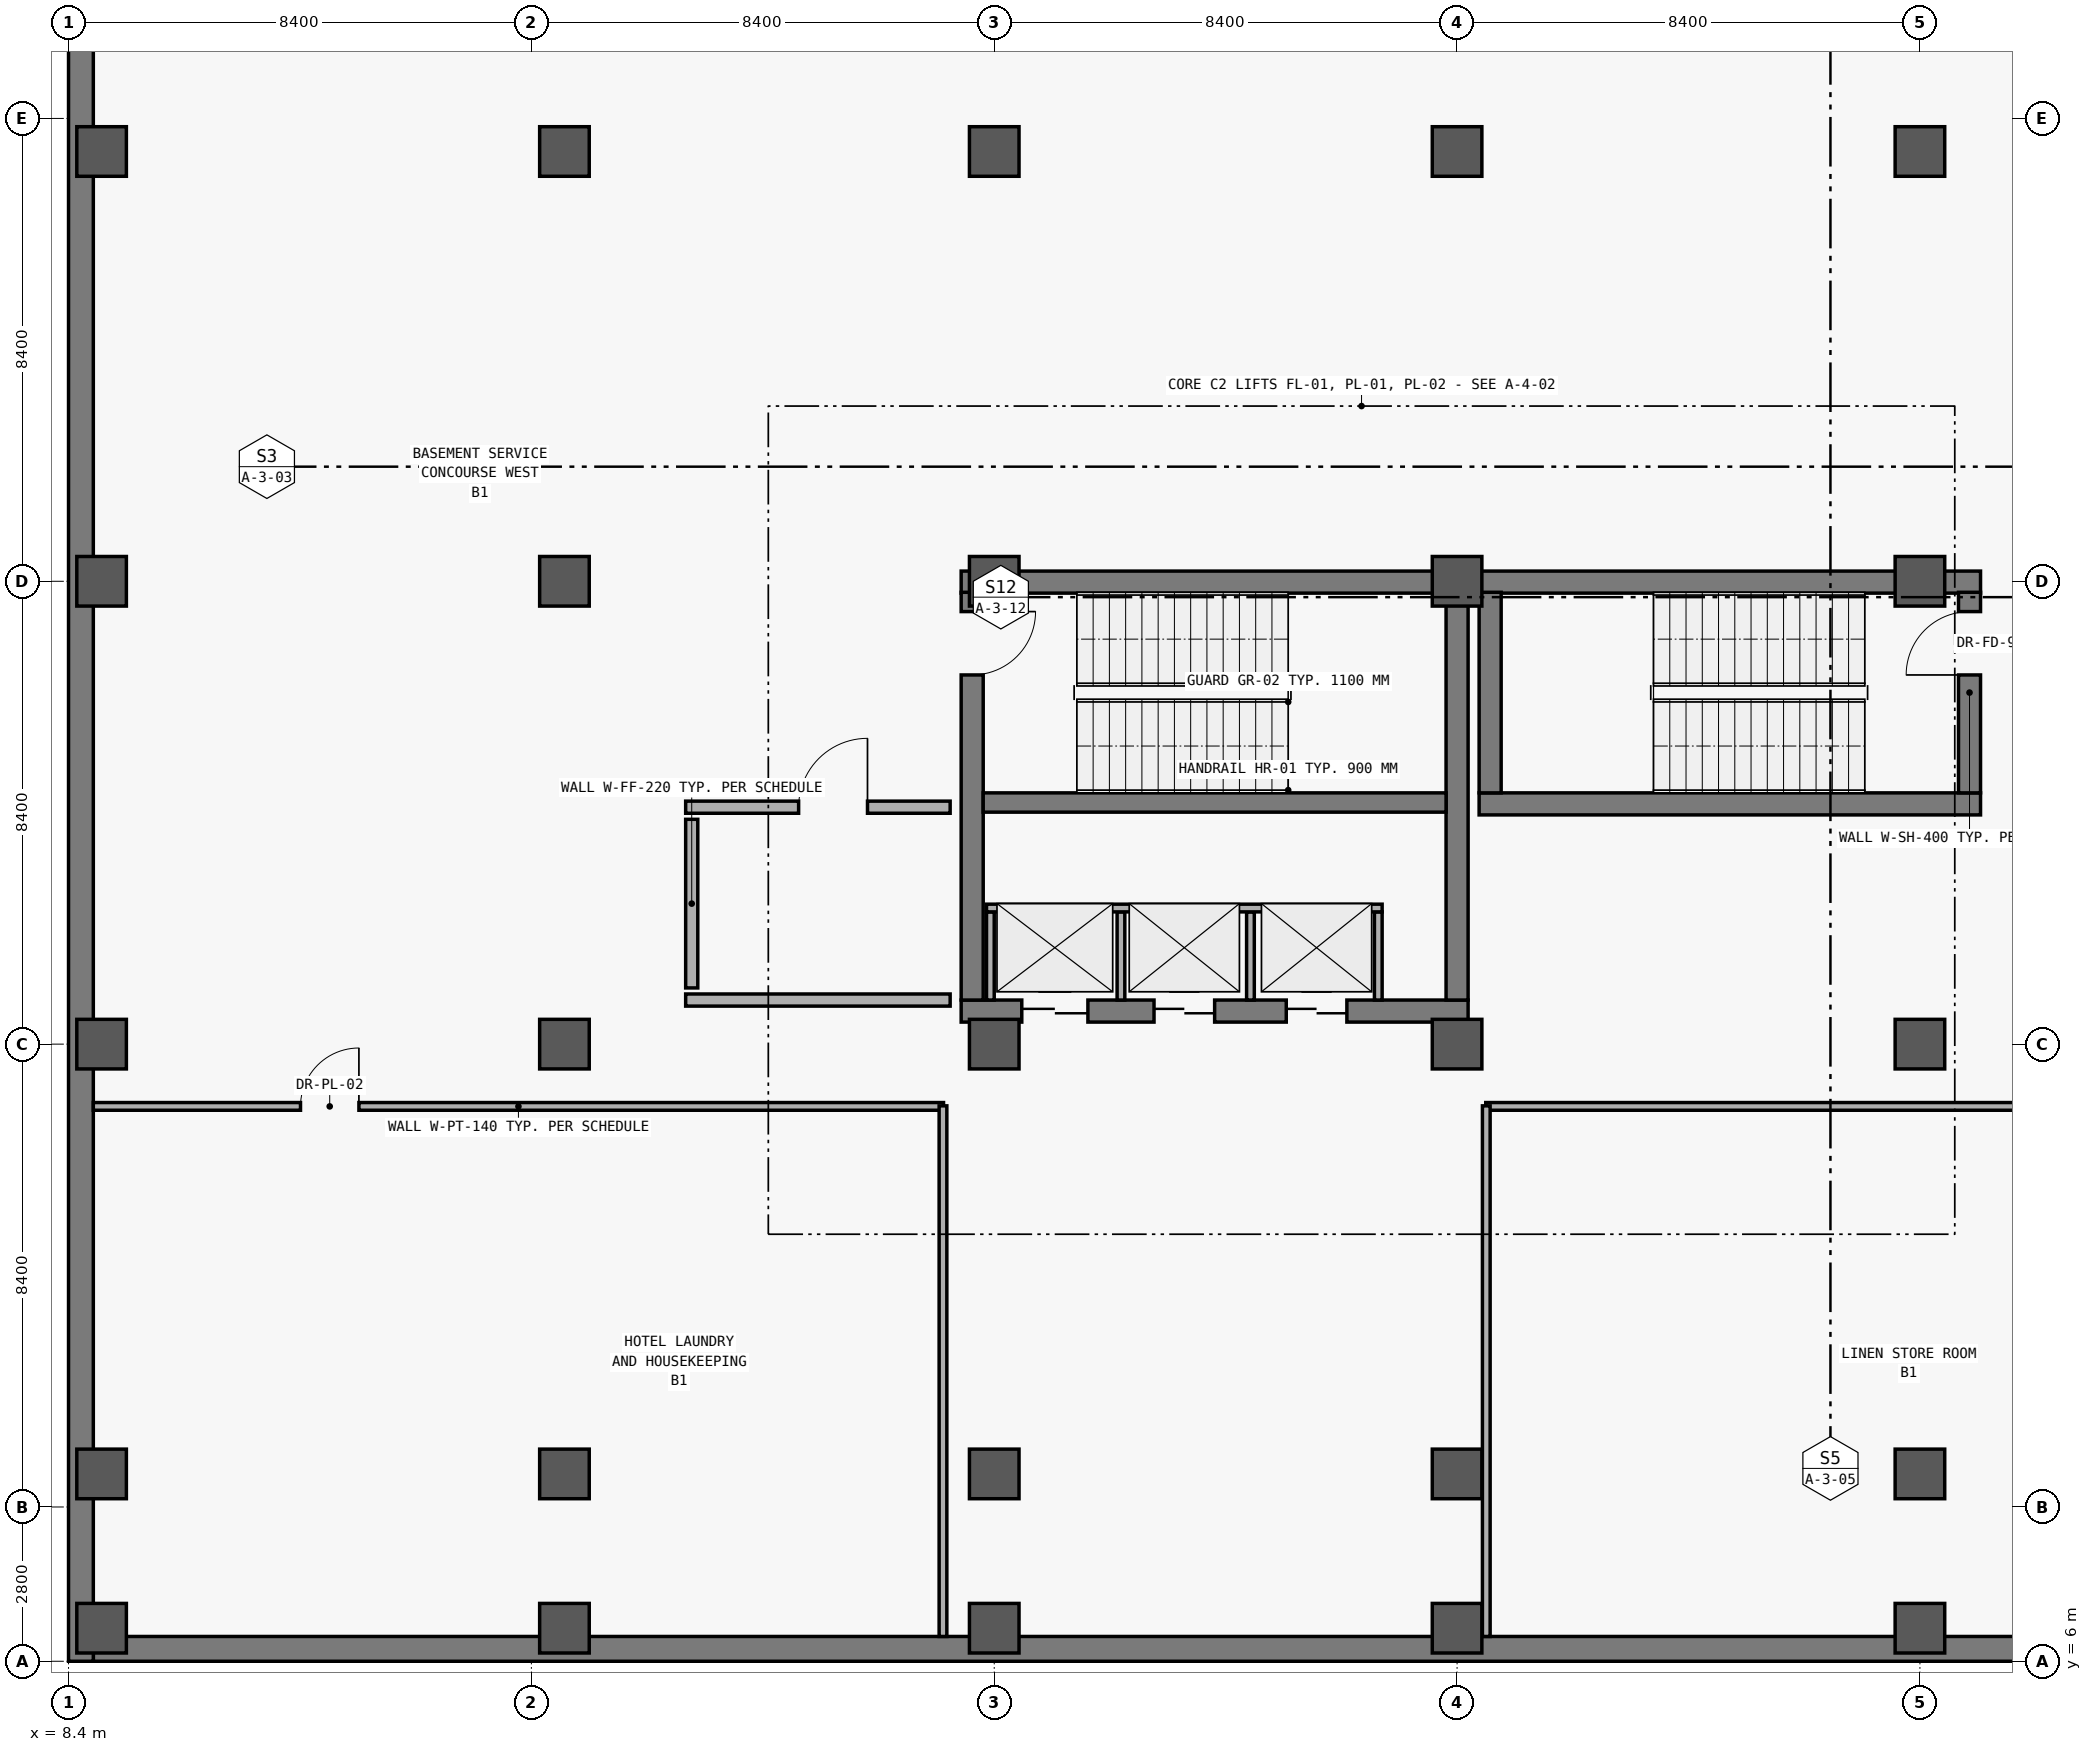
"""IFC4 building model, lengths in metres.
Left out: names, types, materials, properties, quantities, classifications, styles, units other than length and angle.
Written with IfcOpenShell. Run it as: python <this file> out.ifc"""

import sys

from ifc_helpers import new_model, si_unit, direction, frame, frame_2d, origin, origin_2d, place, context, subcontext, project, spatial, rectangle, extrude, element, fill, save


model = new_model("IFC4")
c1 = context("Model", 3, precision=1e-05, world=origin(), true_north=direction((0.0, 1.0)))
c2 = subcontext(c1, "Body", "Model", "MODEL_VIEW")
j1 = project(units=[si_unit("LENGTHUNIT", "METRE"), si_unit("PLANEANGLEUNIT", "RADIAN")], contexts=[c1])
p1 = place(None, origin())
s1 = spatial("IfcSite", under=j1, at=p1, CompositionType="ELEMENT")
p2 = place(p1, origin())
s2 = spatial("IfcBuilding", under=s1, at=p2, CompositionType="ELEMENT")
p3 = place(p2, frame((0.0, 0.0, -4.8)))
s3 = spatial("IfcBuildingStorey", under=s2, at=p3, CompositionType="ELEMENT", Elevation=-4.8)
p4 = place(p3, frame((142.2, 6.225, 0.0), z_axis=(0.0, 0.0, 1.0), x_axis=(-1.0, 0.0, 0.0)))
e1 = element("IfcWall", 1, at=p4, inside=s3, PredefinedType="USERDEFINED", context=c2, shape_type="SweptSolid", body=[
    extrude(rectangle(XDim=133.35, YDim=0.45, at=frame_2d((66.675, 0.0))), origin(), (0.0, 0.0, 1.0), 4.48),
])
p5 = place(p3, frame((8.625, 6.0, 0.0), z_axis=(0.0, 0.0, 1.0), x_axis=(0.0, 1.0, 0.0)))
e2 = element("IfcWall", 2, at=p5, inside=s3, PredefinedType="USERDEFINED", context=c2, shape_type="SweptSolid", body=[
    extrude(rectangle(XDim=112.0, YDim=0.45, at=frame_2d((56.0, 0.0))), origin(), (0.0, 0.0, 1.0), 4.48),
])
for number, where, z_axis, x_axis in (
    (3, (9.0, 6.6, 0.0), (0.0, 0.0, 1.0), (1.0, 0.0, 0.0)),
    (4, (9.0, 9.4, 0.0), (0.0, 0.0, 1.0), (1.0, 0.0, 0.0)),
    (5, (9.0, 17.2, 0.0), (0.0, 0.0, 1.0), (1.0, 0.0, 0.0)),
    (6, (9.0, 25.6, 0.0), (0.0, 0.0, 1.0), (1.0, 0.0, 0.0)),
    (7, (9.0, 33.4, 0.0), (0.0, 0.0, 1.0), (1.0, 0.0, 0.0)),
    (8, (17.4, 6.6, 0.0), (0.0, 0.0, 1.0), (1.0, 0.0, 0.0)),
    (9, (17.4, 9.4, 0.0), (0.0, 0.0, 1.0), (1.0, 0.0, 0.0)),
    (10, (17.4, 17.2, 0.0), (0.0, 0.0, 1.0), (1.0, 0.0, 0.0)),
    (11, (17.4, 25.6, 0.0), (0.0, 0.0, 1.0), (1.0, 0.0, 0.0)),
    (12, (17.4, 33.4, 0.0), (0.0, 0.0, 1.0), (1.0, 0.0, 0.0)),
    (13, (25.2, 6.6, 0.0), (0.0, 0.0, 1.0), (1.0, 0.0, 0.0)),
    (14, (25.2, 9.4, 0.0), (0.0, 0.0, 1.0), (1.0, 0.0, 0.0)),
    (15, (25.2, 17.2, 0.0), (0.0, 0.0, 1.0), (1.0, 0.0, 0.0)),
    (16, (25.2, 25.6, 0.0), (0.0, 0.0, 1.0), (1.0, 0.0, 0.0)),
    (17, (25.2, 33.4, 0.0), (0.0, 0.0, 1.0), (1.0, 0.0, 0.0)),
    (18, (33.6, 6.6, 0.0), (0.0, 0.0, 1.0), (1.0, 0.0, 0.0)),
    (19, (33.6, 9.4, 0.0), (0.0, 0.0, 1.0), (1.0, 0.0, 0.0)),
    (20, (33.6, 17.2, 0.0), (0.0, 0.0, 1.0), (1.0, 0.0, 0.0)),
    (21, (33.6, 25.6, 0.0), (0.0, 0.0, 1.0), (1.0, 0.0, 0.0)),
    (22, (33.6, 33.4, 0.0), (0.0, 0.0, 1.0), (1.0, 0.0, 0.0)),
    (23, (42.0, 6.6, 0.0), (0.0, 0.0, 1.0), (1.0, 0.0, 0.0)),
    (24, (42.0, 9.4, 0.0), (0.0, 0.0, 1.0), (1.0, 0.0, 0.0)),
    (25, (42.0, 17.2, 0.0), (0.0, 0.0, 1.0), (1.0, 0.0, 0.0)),
    (26, (42.0, 25.6, 0.0), (0.0, 0.0, 1.0), (1.0, 0.0, 0.0)),
    (27, (42.0, 33.4, 0.0), (0.0, 0.0, 1.0), (1.0, 0.0, 0.0)),
):
    element("IfcColumn", number, at=place(p3, frame(where, z_axis=z_axis, x_axis=x_axis)), inside=s3, PredefinedType="COLUMN", context=c2, shape_type="SweptSolid", body=[
        extrude(rectangle(XDim=0.9, YDim=0.9, at=origin_2d()), origin(), (0.0, 0.0, 1.0), 4.8),
    ])
p6 = place(p3, frame((24.6, 17.8, 0.0), z_axis=(0.0, 0.0, 1.0), x_axis=(1.0, 0.0, 0.0)))
e28 = element("IfcWall", 28, at=p6, inside=s3, PredefinedType="SHEAR", context=c2, shape_type="SweptSolid", body=[
    extrude(rectangle(XDim=9.2, YDim=0.4, at=frame_2d((4.6, 0.0))), origin(), (0.0, 0.0, 1.0), 4.48),
])
p7 = place(p6, frame((1.1, 0.0, 0.0)))
e29 = element("IfcOpeningElement", 29, at=p7, cuts=e28, PredefinedType="OPENING", context=c2, shape_type="SweptSolid", body=[
    extrude(rectangle(XDim=1.2, YDim=2.2, at=frame_2d((0.6, 1.1))), frame((0.0, 0.21, 0.0), z_axis=(0.0, -1.0, 0.0), x_axis=(1.0, 0.0, 0.0)), (0.0, 0.0, 1.0), 0.42),
])
p8 = place(p6, frame((3.5, 0.0, 0.0)))
e30 = element("IfcOpeningElement", 30, at=p8, cuts=e28, PredefinedType="OPENING", context=c2, shape_type="SweptSolid", body=[
    extrude(rectangle(XDim=1.1, YDim=2.2, at=frame_2d((0.55, 1.1))), frame((0.0, 0.21, 0.0), z_axis=(0.0, -1.0, 0.0), x_axis=(1.0, 0.0, 0.0)), (0.0, 0.0, 1.0), 0.42),
])
p9 = place(p6, frame((5.9, 0.0, 0.0)))
e31 = element("IfcOpeningElement", 31, at=p9, cuts=e28, PredefinedType="OPENING", context=c2, shape_type="SweptSolid", body=[
    extrude(rectangle(XDim=1.1, YDim=2.2, at=frame_2d((0.55, 1.1))), frame((0.0, 0.21, 0.0), z_axis=(0.0, -1.0, 0.0), x_axis=(1.0, 0.0, 0.0)), (0.0, 0.0, 1.0), 0.42),
])
p10 = place(p3, frame((33.8, 25.585, 0.0), z_axis=(0.0, 0.0, 1.0), x_axis=(-1.0, 0.0, 0.0)))
e32 = element("IfcWall", 32, at=p10, inside=s3, PredefinedType="SHEAR", context=c2, shape_type="SweptSolid", body=[
    extrude(rectangle(XDim=9.2, YDim=0.4, at=frame_2d((4.6, 0.0))), origin(), (0.0, 0.0, 1.0), 4.48),
])
p11 = place(p3, frame((24.8, 25.4, 0.0), z_axis=(0.0, 0.0, 1.0), x_axis=(0.0, -1.0, 0.0)))
e33 = element("IfcWall", 33, at=p11, inside=s3, PredefinedType="SHEAR", context=c2, shape_type="SweptSolid", body=[
    extrude(rectangle(XDim=7.4, YDim=0.4, at=frame_2d((3.7, 0.0))), origin(), (0.0, 0.0, 1.0), 4.48),
])
p12 = place(p11, frame((0.35, 0.0, 0.0)))
e34 = element("IfcOpeningElement", 34, at=p12, cuts=e33, PredefinedType="OPENING", context=c2, shape_type="SweptSolid", body=[
    extrude(rectangle(XDim=1.15, YDim=2.2, at=frame_2d((0.575, 1.1))), frame((0.0, 0.21, 0.0), z_axis=(0.0, -1.0, 0.0), x_axis=(1.0, 0.0, 0.0)), (0.0, 0.0, 1.0), 0.42),
])
p13 = place(p3, frame((33.6, 18.0, 0.0), z_axis=(0.0, 0.0, 1.0), x_axis=(0.0, 1.0, 0.0)))
e35 = element("IfcWall", 35, at=p13, inside=s3, PredefinedType="SHEAR", context=c2, shape_type="SweptSolid", body=[
    extrude(rectangle(XDim=7.4, YDim=0.4, at=frame_2d((3.7, 0.0))), origin(), (0.0, 0.0, 1.0), 4.48),
])
p14 = place(p3, frame((25.0, 21.585, 0.0), z_axis=(0.0, 0.0, 1.0), x_axis=(1.0, 0.0, 0.0)))
e36 = element("IfcWall", 36, at=p14, inside=s3, PredefinedType="SHEAR", context=c2, shape_type="SweptSolid", body=[
    extrude(rectangle(XDim=8.4, YDim=0.35, at=frame_2d((4.2, 0.0))), origin(), (0.0, 0.0, 1.0), 4.48),
])
for number, where, z_axis, x_axis in (
    (37, (25.13, 18.0, 0.0), (0.0, 0.0, 1.0), (0.0, 1.0, 0.0)),
    (38, (27.5, 18.0, 0.0), (0.0, 0.0, 1.0), (0.0, 1.0, 0.0)),
    (39, (29.85, 18.0, 0.0), (0.0, 0.0, 1.0), (0.0, 1.0, 0.0)),
    (40, (32.17, 18.0, 0.0), (0.0, 0.0, 1.0), (0.0, 1.0, 0.0)),
):
    element("IfcWall", number, at=place(p3, frame(where, z_axis=z_axis, x_axis=x_axis)), inside=s3, PredefinedType="PARTITIONING", context=c2, shape_type="SweptSolid", body=[
        extrude(rectangle(XDim=1.6, YDim=0.14, at=frame_2d((0.8, 0.0))), origin(), (0.0, 0.0, 1.0), 3.63),
    ])
p15 = place(p3, frame((25.06, 19.67, 0.0), z_axis=(0.0, 0.0, 1.0), x_axis=(1.0, 0.0, 0.0)))
e41 = element("IfcWall", 41, at=p15, inside=s3, PredefinedType="PARTITIONING", context=c2, shape_type="SweptSolid", body=[
    extrude(rectangle(XDim=7.18, YDim=0.14, at=frame_2d((3.59, 0.0))), origin(), (0.0, 0.0, 1.0), 3.63),
])
p16 = place(p3, frame((19.6, 18.0, 0.0), z_axis=(0.0, 0.0, 1.0), x_axis=(1.0, 0.0, 0.0)))
e42 = element("IfcWall", 42, at=p16, inside=s3, PredefinedType="SOLIDWALL", context=c2, shape_type="SweptSolid", body=[
    extrude(rectangle(XDim=4.8, YDim=0.22, at=frame_2d((2.4, 0.0))), origin(), (0.0, 0.0, 1.0), 3.63),
])
p17 = place(p3, frame((19.6, 21.5, 0.0), z_axis=(0.0, 0.0, 1.0), x_axis=(1.0, 0.0, 0.0)))
e43 = element("IfcWall", 43, at=p17, inside=s3, PredefinedType="SOLIDWALL", context=c2, shape_type="SweptSolid", body=[
    extrude(rectangle(XDim=4.8, YDim=0.22, at=frame_2d((2.4, 0.0))), origin(), (0.0, 0.0, 1.0), 3.63),
])
p18 = place(p17, frame((2.05, 0.0, 0.0)))
e44 = element("IfcOpeningElement", 44, at=p18, cuts=e43, PredefinedType="OPENING", context=c2, shape_type="SweptSolid", body=[
    extrude(rectangle(XDim=1.25, YDim=2.2, at=frame_2d((0.625, 1.1))), frame((0.0, 0.12, 0.0), z_axis=(0.0, -1.0, 0.0), x_axis=(1.0, 0.0, 0.0)), (0.0, 0.0, 1.0), 0.24),
])
p19 = place(p3, frame((19.71, 18.22, 0.0), z_axis=(0.0, 0.0, 1.0), x_axis=(0.0, 1.0, 0.0)))
e45 = element("IfcWall", 45, at=p19, inside=s3, PredefinedType="SOLIDWALL", context=c2, shape_type="SweptSolid", body=[
    extrude(rectangle(XDim=3.06, YDim=0.22, at=frame_2d((1.53, 0.0))), origin(), (0.0, 0.0, 1.0), 3.63),
])
for number, where, z_axis, x_axis in (
    (46, (34.0, 21.56, 0.0), (0.0, 0.0, 1.0), (1.0, 0.0, 0.0)),
    (47, (43.1, 25.585, 0.0), (0.0, 0.0, 1.0), (-1.0, 0.0, 0.0)),
):
    element("IfcWall", number, at=place(p3, frame(where, z_axis=z_axis, x_axis=x_axis)), inside=s3, PredefinedType="SHEAR", context=c2, shape_type="SweptSolid", body=[
        extrude(rectangle(XDim=9.1, YDim=0.4, at=frame_2d((4.55, 0.0))), origin(), (0.0, 0.0, 1.0), 4.48),
    ])
p20 = place(p3, frame((34.2, 25.4, 0.0), z_axis=(0.0, 0.0, 1.0), x_axis=(0.0, -1.0, 0.0)))
e48 = element("IfcWall", 48, at=p20, inside=s3, PredefinedType="SHEAR", context=c2, shape_type="SweptSolid", body=[
    extrude(rectangle(XDim=3.64, YDim=0.4, at=frame_2d((1.82, 0.0))), origin(), (0.0, 0.0, 1.0), 4.48),
])
p21 = place(p3, frame((42.9, 21.76, 0.0), z_axis=(0.0, 0.0, 1.0), x_axis=(0.0, 1.0, 0.0)))
e49 = element("IfcWall", 49, at=p21, inside=s3, PredefinedType="SHEAR", context=c2, shape_type="SweptSolid", body=[
    extrude(rectangle(XDim=3.64, YDim=0.4, at=frame_2d((1.82, 0.0))), origin(), (0.0, 0.0, 1.0), 4.48),
])
p22 = place(p21, frame((2.14, 0.0, 0.0)))
e50 = element("IfcOpeningElement", 50, at=p22, cuts=e49, PredefinedType="OPENING", context=c2, shape_type="SweptSolid", body=[
    extrude(rectangle(XDim=1.15, YDim=2.2, at=frame_2d((0.575, 1.1))), frame((0.0, 0.21, 0.0), z_axis=(0.0, -1.0, 0.0), x_axis=(1.0, 0.0, 0.0)), (0.0, 0.0, 1.0), 0.42),
])
p23 = place(p3, frame((8.85, 16.07, 0.0), z_axis=(0.0, 0.0, 1.0), x_axis=(1.0, 0.0, 0.0)))
e51 = element("IfcWall", 51, at=p23, inside=s3, PredefinedType="PARTITIONING", context=c2, shape_type="SweptSolid", body=[
    extrude(rectangle(XDim=15.43, YDim=0.14, at=frame_2d((7.715, 0.0))), origin(), (0.0, 0.0, 1.0), 3.58),
])
p24 = place(p23, frame((3.76, 0.0, 0.0)))
e52 = element("IfcOpeningElement", 52, at=p24, cuts=e51, PredefinedType="OPENING", context=c2, shape_type="SweptSolid", body=[
    extrude(rectangle(XDim=1.06, YDim=2.2, at=frame_2d((0.53, 1.1))), frame((0.0, 0.08, 0.0), z_axis=(0.0, -1.0, 0.0), x_axis=(1.0, 0.0, 0.0)), (0.0, 0.0, 1.0), 0.16),
])
p25 = place(p3, frame((34.12, 16.07, 0.0), z_axis=(0.0, 0.0, 1.0), x_axis=(1.0, 0.0, 0.0)))
e53 = element("IfcWall", 53, at=p25, inside=s3, PredefinedType="PARTITIONING", context=c2, shape_type="SweptSolid", body=[
    extrude(rectangle(XDim=15.36, YDim=0.14, at=frame_2d((7.68, 0.0))), origin(), (0.0, 0.0, 1.0), 3.58),
])
p26 = place(p25, frame((11.483, 0.0, 0.0)))
e54 = element("IfcOpeningElement", 54, at=p26, cuts=e53, PredefinedType="OPENING", context=c2, shape_type="SweptSolid", body=[
    extrude(rectangle(XDim=1.06, YDim=2.2, at=frame_2d((0.53, 1.1))), frame((0.0, 0.08, 0.0), z_axis=(0.0, -1.0, 0.0), x_axis=(1.0, 0.0, 0.0)), (0.0, 0.0, 1.0), 0.16),
])
for number, where, z_axis, x_axis in (
    (55, (24.27, 6.45, 0.0), (0.0, 0.0, 1.0), (0.0, 1.0, 0.0)),
    (56, (34.13, 6.45, 0.0), (0.0, 0.0, 1.0), (0.0, 1.0, 0.0)),
):
    element("IfcWall", number, at=place(p3, frame(where, z_axis=z_axis, x_axis=x_axis)), inside=s3, PredefinedType="PARTITIONING", context=c2, shape_type="SweptSolid", body=[
        extrude(rectangle(XDim=9.63, YDim=0.14, at=frame_2d((4.815, 0.0))), origin(), (0.0, 0.0, 1.0), 3.58),
    ])
p27 = place(p12, origin())
e57 = element("IfcDoor", 57, at=p27, inside=s3, OperationType="SINGLE_SWING_LEFT", PredefinedType="DOOR", context=c2, shape_type="SweptSolid", body=[
    extrude(rectangle(XDim=1.15, YDim=2.2, at=frame_2d((0.575, 1.1))), frame((0.0, 0.025, 0.0), z_axis=(0.0, -1.0, 0.0), x_axis=(1.0, 0.0, 0.0)), (0.0, 0.0, 1.0), 0.05),
])
fill(e34, e57)
p28 = place(p7, origin())
e58 = element("IfcDoor", 58, at=p28, inside=s3, OperationType="DOUBLE_DOOR_SLIDING", PredefinedType="DOOR", context=c2, shape_type="SweptSolid", body=[
    extrude(rectangle(XDim=1.2, YDim=2.2, at=frame_2d((0.6, 1.1))), frame((0.0, 0.025, 0.0), z_axis=(0.0, -1.0, 0.0), x_axis=(1.0, 0.0, 0.0)), (0.0, 0.0, 1.0), 0.05),
])
fill(e29, e58)
p29 = place(p8, origin())
e59 = element("IfcDoor", 59, at=p29, inside=s3, OperationType="DOUBLE_DOOR_SLIDING", PredefinedType="DOOR", context=c2, shape_type="SweptSolid", body=[
    extrude(rectangle(XDim=1.1, YDim=2.2, at=frame_2d((0.55, 1.1))), frame((0.0, 0.025, 0.0), z_axis=(0.0, -1.0, 0.0), x_axis=(1.0, 0.0, 0.0)), (0.0, 0.0, 1.0), 0.05),
])
fill(e30, e59)
p30 = place(p9, origin())
e60 = element("IfcDoor", 60, at=p30, inside=s3, OperationType="DOUBLE_DOOR_SLIDING", PredefinedType="DOOR", context=c2, shape_type="SweptSolid", body=[
    extrude(rectangle(XDim=1.1, YDim=2.2, at=frame_2d((0.55, 1.1))), frame((0.0, 0.025, 0.0), z_axis=(0.0, -1.0, 0.0), x_axis=(1.0, 0.0, 0.0)), (0.0, 0.0, 1.0), 0.05),
])
fill(e31, e60)
p31 = place(p18, origin())
e61 = element("IfcDoor", 61, at=p31, inside=s3, OperationType="SINGLE_SWING_RIGHT", PredefinedType="DOOR", context=c2, shape_type="SweptSolid", body=[
    extrude(rectangle(XDim=1.25, YDim=2.2, at=frame_2d((0.625, 1.1))), frame((0.0, 0.025, 0.0), z_axis=(0.0, -1.0, 0.0), x_axis=(1.0, 0.0, 0.0)), (0.0, 0.0, 1.0), 0.05),
])
fill(e44, e61)
p32 = place(p22, origin())
e62 = element("IfcDoor", 62, at=p32, inside=s3, OperationType="SINGLE_SWING_LEFT", PredefinedType="DOOR", context=c2, shape_type="SweptSolid", body=[
    extrude(rectangle(XDim=1.15, YDim=2.2, at=frame_2d((0.575, 1.1))), frame((0.0, 0.025, 0.0), z_axis=(0.0, -1.0, 0.0), x_axis=(1.0, 0.0, 0.0)), (0.0, 0.0, 1.0), 0.05),
])
fill(e50, e62)
p33 = place(p24, origin())
e63 = element("IfcDoor", 63, at=p33, inside=s3, OperationType="SINGLE_SWING_RIGHT", PredefinedType="DOOR", context=c2, shape_type="SweptSolid", body=[
    extrude(rectangle(XDim=1.06, YDim=2.2, at=frame_2d((0.53, 1.1))), frame((0.0, 0.025, 0.0), z_axis=(0.0, -1.0, 0.0), x_axis=(1.0, 0.0, 0.0)), (0.0, 0.0, 1.0), 0.05),
])
fill(e52, e63)
save(model, sys.argv[1])
